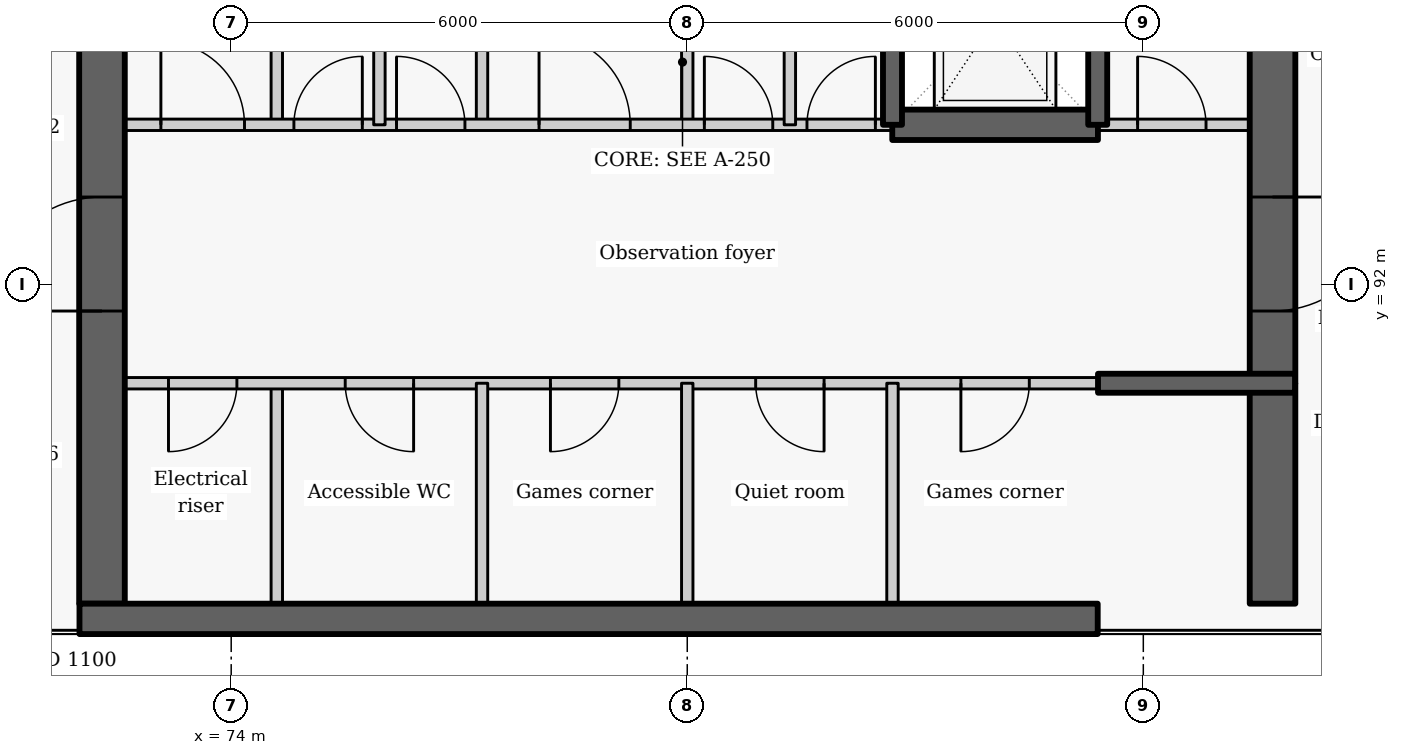
"""IFC4 building model, lengths in metres.
Left out: names, types, materials, properties, quantities, classifications, styles, units other than length and angle.
Written with IfcOpenShell. Run it as: python <this file> out.ifc"""

import sys

from ifc_helpers import new_model, si_unit, direction, frame, frame_2d, origin, place, context, subcontext, project, spatial, rectangle, extrude, element, fill, save


model = new_model("IFC4")
c1 = context("Model", 3, precision=1e-05, world=origin(), true_north=direction((0.0, 1.0)))
c2 = subcontext(c1, "Body", "Model", "MODEL_VIEW")
j1 = project(units=[si_unit("LENGTHUNIT", "METRE"), si_unit("PLANEANGLEUNIT", "RADIAN")], contexts=[c1])
p1 = place(None, origin())
s1 = spatial("IfcSite", under=j1, at=p1, CompositionType="ELEMENT")
p2 = place(p1, origin())
s2 = spatial("IfcBuilding", under=s1, at=p2, CompositionType="ELEMENT")
p3 = place(p2, frame((0.0, 0.0, 290.4)))
s3 = spatial("IfcBuildingStorey", under=s2, at=p3, CompositionType="ELEMENT", Elevation=290.4)
p4 = place(p3, frame((74.6, 87.8, 0.0), z_axis=(0.0, 0.0, 1.0), x_axis=(0.0, 1.0, 0.0)))
e1 = element("IfcWall", 1, at=p4, inside=s3, PredefinedType="PARTITIONING", context=c2, shape_type="SweptSolid", body=[
    extrude(rectangle(XDim=2.9, YDim=0.15, at=frame_2d((1.45, 0.0))), origin(), (0.0, 0.0, 1.0), 3.325),
])
p5 = place(p3, frame((74.6, 94.1, 0.0), z_axis=(0.0, 0.0, 1.0), x_axis=(0.0, 1.0, 0.0)))
e2 = element("IfcWall", 2, at=p5, inside=s3, PredefinedType="PARTITIONING", context=c2, shape_type="SweptSolid", body=[
    extrude(rectangle(XDim=2.8, YDim=0.15, at=frame_2d((1.4, 0.0))), origin(), (0.0, 0.0, 1.0), 3.325),
])
p6 = place(p3, frame((85.4, 90.7, 0.0), z_axis=(0.0, 0.0, 1.0), x_axis=(-1.0, 0.0, 0.0)))
e3 = element("IfcWall", 3, at=p6, inside=s3, PredefinedType="PARTITIONING", context=c2, shape_type="SweptSolid", body=[
    extrude(rectangle(XDim=13.4, YDim=0.15, at=frame_2d((6.7, 0.0))), origin(), (0.0, 0.0, 1.0), 3.325),
])
p7 = place(p6, frame((11.325, 0.0, 0.0)))
e4 = element("IfcOpeningElement", 4, at=p7, cuts=e3, PredefinedType="OPENING", context=c2, shape_type="SweptSolid", body=[
    extrude(rectangle(XDim=0.9, YDim=2.1, at=frame_2d((0.45, 1.05))), frame((0.0, 0.085, 0.0), z_axis=(0.0, -1.0, 0.0), x_axis=(1.0, 0.0, 0.0)), (0.0, 0.0, 1.0), 0.17),
])
p8 = place(p6, frame((9.0, 0.0, 0.0)))
e5 = element("IfcOpeningElement", 5, at=p8, cuts=e3, PredefinedType="OPENING", context=c2, shape_type="SweptSolid", body=[
    extrude(rectangle(XDim=0.9, YDim=2.1, at=frame_2d((0.45, 1.05))), frame((0.0, 0.085, 0.0), z_axis=(0.0, -1.0, 0.0), x_axis=(1.0, 0.0, 0.0)), (0.0, 0.0, 1.0), 0.17),
])
p9 = place(p6, frame((6.3, 0.0, 0.0)))
e6 = element("IfcOpeningElement", 6, at=p9, cuts=e3, PredefinedType="OPENING", context=c2, shape_type="SweptSolid", body=[
    extrude(rectangle(XDim=0.9, YDim=2.1, at=frame_2d((0.45, 1.05))), frame((0.0, 0.085, 0.0), z_axis=(0.0, -1.0, 0.0), x_axis=(1.0, 0.0, 0.0)), (0.0, 0.0, 1.0), 0.17),
])
p10 = place(p6, frame((3.6, 0.0, 0.0)))
e7 = element("IfcOpeningElement", 7, at=p10, cuts=e3, PredefinedType="OPENING", context=c2, shape_type="SweptSolid", body=[
    extrude(rectangle(XDim=0.9, YDim=2.1, at=frame_2d((0.45, 1.05))), frame((0.0, 0.085, 0.0), z_axis=(0.0, -1.0, 0.0), x_axis=(1.0, 0.0, 0.0)), (0.0, 0.0, 1.0), 0.17),
])
p11 = place(p6, frame((0.9, 0.0, 0.0)))
e8 = element("IfcOpeningElement", 8, at=p11, cuts=e3, PredefinedType="OPENING", context=c2, shape_type="SweptSolid", body=[
    extrude(rectangle(XDim=0.9, YDim=2.1, at=frame_2d((0.45, 1.05))), frame((0.0, 0.085, 0.0), z_axis=(0.0, -1.0, 0.0), x_axis=(1.0, 0.0, 0.0)), (0.0, 0.0, 1.0), 0.17),
])
p12 = place(p3, frame((72.3, 87.8, -0.275), z_axis=(0.0, 0.0, 1.0), x_axis=(0.0, 1.0, 0.0)))
e9 = element("IfcWall", 9, at=p12, inside=s3, PredefinedType="SHEAR", context=c2, shape_type="SweptSolid", body=[
    extrude(rectangle(XDim=9.1, YDim=0.6, at=frame_2d((4.55, 0.0))), origin(), (0.0, 0.0, 1.0), 3.6),
])
p13 = place(p12, frame((3.85, 0.0, 0.275)))
e10 = element("IfcOpeningElement", 10, at=p13, cuts=e9, PredefinedType="OPENING", context=c2, shape_type="SweptSolid", body=[
    extrude(rectangle(XDim=1.5, YDim=2.1, at=frame_2d((0.75, 1.05))), frame((0.0, 0.31, 0.0), z_axis=(0.0, -1.0, 0.0), x_axis=(1.0, 0.0, 0.0)), (0.0, 0.0, 1.0), 0.62),
])
p14 = place(p3, frame((77.3, 87.8, 0.0), z_axis=(0.0, 0.0, 1.0), x_axis=(0.0, 1.0, 0.0)))
e11 = element("IfcWall", 11, at=p14, inside=s3, PredefinedType="PARTITIONING", context=c2, shape_type="SweptSolid", body=[
    extrude(rectangle(XDim=2.9, YDim=0.15, at=frame_2d((1.45, 0.0))), origin(), (0.0, 0.0, 1.0), 3.325),
])
p15 = place(p3, frame((77.3, 94.1, 0.0), z_axis=(0.0, 0.0, 1.0), x_axis=(0.0, 1.0, 0.0)))
e12 = element("IfcWall", 12, at=p15, inside=s3, PredefinedType="PARTITIONING", context=c2, shape_type="SweptSolid", body=[
    extrude(rectangle(XDim=2.8, YDim=0.15, at=frame_2d((1.4, 0.0))), origin(), (0.0, 0.0, 1.0), 3.325),
])
p16 = place(p3, frame((80.0, 87.8, 0.0), z_axis=(0.0, 0.0, 1.0), x_axis=(0.0, 1.0, 0.0)))
e13 = element("IfcWall", 13, at=p16, inside=s3, PredefinedType="PARTITIONING", context=c2, shape_type="SweptSolid", body=[
    extrude(rectangle(XDim=2.9, YDim=0.15, at=frame_2d((1.45, 0.0))), origin(), (0.0, 0.0, 1.0), 3.325),
])
p17 = place(p3, frame((80.0, 94.1, 0.0), z_axis=(0.0, 0.0, 1.0), x_axis=(0.0, 1.0, 0.0)))
e14 = element("IfcWall", 14, at=p17, inside=s3, PredefinedType="PARTITIONING", context=c2, shape_type="SweptSolid", body=[
    extrude(rectangle(XDim=2.8, YDim=0.15, at=frame_2d((1.4, 0.0))), origin(), (0.0, 0.0, 1.0), 3.325),
])
p18 = place(p3, frame((82.7, 87.8, 0.0), z_axis=(0.0, 0.0, 1.0), x_axis=(0.0, 1.0, 0.0)))
e15 = element("IfcWall", 15, at=p18, inside=s3, PredefinedType="PARTITIONING", context=c2, shape_type="SweptSolid", body=[
    extrude(rectangle(XDim=2.9, YDim=0.15, at=frame_2d((1.45, 0.0))), origin(), (0.0, 0.0, 1.0), 3.325),
])
p19 = place(p3, frame((72.0, 94.1, 0.0), z_axis=(0.0, 0.0, 1.0), x_axis=(1.0, 0.0, 0.0)))
e16 = element("IfcWall", 16, at=p19, inside=s3, PredefinedType="PARTITIONING", context=c2, shape_type="SweptSolid", body=[
    extrude(rectangle(XDim=10.703, YDim=0.15, at=frame_2d((5.352, 0.0))), origin(), (0.0, 0.0, 1.0), 3.325),
])
p20 = place(p19, frame((1.075, 0.0, 0.0)))
e17 = element("IfcOpeningElement", 17, at=p20, cuts=e16, PredefinedType="OPENING", context=c2, shape_type="SweptSolid", body=[
    extrude(rectangle(XDim=1.1, YDim=2.1, at=frame_2d((0.55, 1.05))), frame((0.0, 0.085, 0.0), z_axis=(0.0, -1.0, 0.0), x_axis=(1.0, 0.0, 0.0)), (0.0, 0.0, 1.0), 0.17),
])
p21 = place(p19, frame((2.825, 0.0, 0.0)))
e18 = element("IfcOpeningElement", 18, at=p21, cuts=e16, PredefinedType="OPENING", context=c2, shape_type="SweptSolid", body=[
    extrude(rectangle(XDim=0.9, YDim=2.1, at=frame_2d((0.45, 1.05))), frame((0.0, 0.085, 0.0), z_axis=(0.0, -1.0, 0.0), x_axis=(1.0, 0.0, 0.0)), (0.0, 0.0, 1.0), 0.17),
])
p22 = place(p19, frame((4.175, 0.0, 0.0)))
e19 = element("IfcOpeningElement", 19, at=p22, cuts=e16, PredefinedType="OPENING", context=c2, shape_type="SweptSolid", body=[
    extrude(rectangle(XDim=0.9, YDim=2.1, at=frame_2d((0.45, 1.05))), frame((0.0, 0.085, 0.0), z_axis=(0.0, -1.0, 0.0), x_axis=(1.0, 0.0, 0.0)), (0.0, 0.0, 1.0), 0.17),
])
p23 = place(p19, frame((6.05, 0.0, 0.0)))
e20 = element("IfcOpeningElement", 20, at=p23, cuts=e16, PredefinedType="OPENING", context=c2, shape_type="SweptSolid", body=[
    extrude(rectangle(XDim=1.2, YDim=2.1, at=frame_2d((0.6, 1.05))), frame((0.0, 0.085, 0.0), z_axis=(0.0, -1.0, 0.0), x_axis=(1.0, 0.0, 0.0)), (0.0, 0.0, 1.0), 0.17),
])
p24 = place(p19, frame((8.225, 0.0, 0.0)))
e21 = element("IfcOpeningElement", 21, at=p24, cuts=e16, PredefinedType="OPENING", context=c2, shape_type="SweptSolid", body=[
    extrude(rectangle(XDim=0.9, YDim=2.1, at=frame_2d((0.45, 1.05))), frame((0.0, 0.085, 0.0), z_axis=(0.0, -1.0, 0.0), x_axis=(1.0, 0.0, 0.0)), (0.0, 0.0, 1.0), 0.17),
])
p25 = place(p19, frame((9.575, 0.0, 0.0)))
e22 = element("IfcOpeningElement", 22, at=p25, cuts=e16, PredefinedType="OPENING", context=c2, shape_type="SweptSolid", body=[
    extrude(rectangle(XDim=0.9, YDim=2.1, at=frame_2d((0.45, 1.05))), frame((0.0, 0.085, 0.0), z_axis=(0.0, -1.0, 0.0), x_axis=(1.0, 0.0, 0.0)), (0.0, 0.0, 1.0), 0.17),
])
p26 = place(p3, frame((85.397, 94.1, 0.0), z_axis=(0.0, 0.0, 1.0), x_axis=(1.0, 0.0, 0.0)))
e23 = element("IfcWall", 23, at=p26, inside=s3, PredefinedType="PARTITIONING", context=c2, shape_type="SweptSolid", body=[
    extrude(rectangle(XDim=2.603, YDim=0.15, at=frame_2d((1.302, 0.0))), origin(), (0.0, 0.0, 1.0), 3.325),
])
p27 = place(p26, frame((0.528, 0.0, 0.0)))
e24 = element("IfcOpeningElement", 24, at=p27, cuts=e23, PredefinedType="OPENING", context=c2, shape_type="SweptSolid", body=[
    extrude(rectangle(XDim=0.9, YDim=2.1, at=frame_2d((0.45, 1.05))), frame((0.0, 0.085, 0.0), z_axis=(0.0, -1.0, 0.0), x_axis=(1.0, 0.0, 0.0)), (0.0, 0.0, 1.0), 0.17),
])
p28 = place(p3, frame((82.697, 94.1, -0.275), z_axis=(0.0, 0.0, 1.0), x_axis=(1.0, 0.0, 0.0)))
e25 = element("IfcWall", 25, at=p28, inside=s3, PredefinedType="SHEAR", context=c2, shape_type="SweptSolid", body=[
    extrude(rectangle(XDim=2.706, YDim=0.4, at=frame_2d((1.353, 0.0))), origin(), (0.0, 0.0, 1.0), 3.6),
])
p29 = place(p3, frame((87.7, 102.05, -0.275), z_axis=(0.0, 0.0, 1.0), x_axis=(0.0, -1.0, 0.0)))
e26 = element("IfcWall", 26, at=p29, inside=s3, PredefinedType="SHEAR", context=c2, shape_type="SweptSolid", body=[
    extrude(rectangle(XDim=11.35, YDim=0.6, at=frame_2d((5.675, 0.0))), origin(), (0.0, 0.0, 1.0), 3.6),
])
p30 = place(p29, frame((8.9, 0.0, 0.275)))
e27 = element("IfcOpeningElement", 27, at=p30, cuts=e26, PredefinedType="OPENING", context=c2, shape_type="SweptSolid", body=[
    extrude(rectangle(XDim=1.5, YDim=2.1, at=frame_2d((0.75, 1.05))), frame((0.0, 0.31, 0.0), z_axis=(0.0, -1.0, 0.0), x_axis=(1.0, 0.0, 0.0)), (0.0, 0.0, 1.0), 0.62),
])
p31 = place(p29, frame((2.025, 0.0, 0.275)))
e28 = element("IfcOpeningElement", 28, at=p31, cuts=e26, PredefinedType="OPENING", context=c2, shape_type="SweptSolid", body=[
    extrude(rectangle(XDim=1.1, YDim=2.1, at=frame_2d((0.55, 1.05))), frame((0.0, 0.31, 0.0), z_axis=(0.0, -1.0, 0.0), x_axis=(1.0, 0.0, 0.0)), (0.0, 0.0, 1.0), 0.62),
])
for number, where, z_axis, x_axis in (
    (29, (75.95, 94.1, 0.0), (0.0, 0.0, 1.0), (0.0, 1.0, 0.0)),
    (30, (81.35, 94.1, 0.0), (0.0, 0.0, 1.0), (0.0, 1.0, 0.0)),
):
    element("IfcWall", number, at=place(p3, frame(where, z_axis=z_axis, x_axis=x_axis)), inside=s3, PredefinedType="PARTITIONING", context=c2, shape_type="SweptSolid", body=[
        extrude(rectangle(XDim=2.8, YDim=0.15, at=frame_2d((1.4, 0.0))), origin(), (0.0, 0.0, 1.0), 3.325),
    ])
for number, where, z_axis, x_axis in (
    (31, (82.7, 94.1, -0.275), (0.0, 0.0, 1.0), (0.0, 1.0, 0.0)),
    (32, (85.4, 94.1, -0.275), (0.0, 0.0, 1.0), (0.0, 1.0, 0.0)),
):
    element("IfcWall", number, at=place(p3, frame(where, z_axis=z_axis, x_axis=x_axis)), inside=s3, PredefinedType="SHEAR", context=c2, shape_type="SweptSolid", body=[
        extrude(rectangle(XDim=2.8, YDim=0.25, at=frame_2d((1.4, 0.0))), origin(), (0.0, 0.0, 1.0), 3.6),
    ])
p32 = place(p3, frame((72.004, 87.6, -0.275), z_axis=(0.0, 0.0, 1.0), x_axis=(1.0, 0.0, 0.0)))
e33 = element("IfcWall", 33, at=p32, inside=s3, PredefinedType="SHEAR", context=c2, shape_type="SweptSolid", body=[
    extrude(rectangle(XDim=13.396, YDim=0.4, at=frame_2d((6.698, 0.0))), origin(), (0.0, 0.0, 1.0), 3.6),
])
p33 = place(p3, frame((87.7, 87.8, -0.275), z_axis=(0.0, 0.0, 1.0), x_axis=(0.0, 1.0, 0.0)))
e34 = element("IfcWall", 34, at=p33, inside=s3, PredefinedType="SHEAR", context=c2, shape_type="SweptSolid", body=[
    extrude(rectangle(XDim=2.896, YDim=0.6, at=frame_2d((1.448, 0.0))), origin(), (0.0, 0.0, 1.0), 3.6),
])
p34 = place(p3, frame((85.404, 90.7, -0.275), z_axis=(0.0, 0.0, 1.0), x_axis=(1.0, 0.0, 0.0)))
e35 = element("IfcWall", 35, at=p34, inside=s3, PredefinedType="SHEAR", context=c2, shape_type="SweptSolid", body=[
    extrude(rectangle(XDim=2.592, YDim=0.25, at=frame_2d((1.296, 0.0))), origin(), (0.0, 0.0, 1.0), 3.6),
])
p35 = place(p7, origin())
e36 = element("IfcDoor", 36, at=p35, inside=s3, OperationType="SINGLE_SWING_RIGHT", PredefinedType="DOOR", context=c2, shape_type="SweptSolid", body=[
    extrude(rectangle(XDim=0.9, YDim=2.1, at=frame_2d((0.45, 1.05))), frame((0.0, 0.025, 0.0), z_axis=(0.0, -1.0, 0.0), x_axis=(1.0, 0.0, 0.0)), (0.0, 0.0, 1.0), 0.05),
])
fill(e4, e36)
p36 = place(p8, origin())
e37 = element("IfcDoor", 37, at=p36, inside=s3, OperationType="SINGLE_SWING_LEFT", PredefinedType="DOOR", context=c2, shape_type="SweptSolid", body=[
    extrude(rectangle(XDim=0.9, YDim=2.1, at=frame_2d((0.45, 1.05))), frame((0.0, 0.025, 0.0), z_axis=(0.0, -1.0, 0.0), x_axis=(1.0, 0.0, 0.0)), (0.0, 0.0, 1.0), 0.05),
])
fill(e5, e37)
p37 = place(p9, origin())
e38 = element("IfcDoor", 38, at=p37, inside=s3, OperationType="SINGLE_SWING_RIGHT", PredefinedType="DOOR", context=c2, shape_type="SweptSolid", body=[
    extrude(rectangle(XDim=0.9, YDim=2.1, at=frame_2d((0.45, 1.05))), frame((0.0, 0.025, 0.0), z_axis=(0.0, -1.0, 0.0), x_axis=(1.0, 0.0, 0.0)), (0.0, 0.0, 1.0), 0.05),
])
fill(e6, e38)
p38 = place(p10, origin())
e39 = element("IfcDoor", 39, at=p38, inside=s3, OperationType="SINGLE_SWING_LEFT", PredefinedType="DOOR", context=c2, shape_type="SweptSolid", body=[
    extrude(rectangle(XDim=0.9, YDim=2.1, at=frame_2d((0.45, 1.05))), frame((0.0, 0.025, 0.0), z_axis=(0.0, -1.0, 0.0), x_axis=(1.0, 0.0, 0.0)), (0.0, 0.0, 1.0), 0.05),
])
fill(e7, e39)
p39 = place(p11, origin())
e40 = element("IfcDoor", 40, at=p39, inside=s3, OperationType="SINGLE_SWING_RIGHT", PredefinedType="DOOR", context=c2, shape_type="SweptSolid", body=[
    extrude(rectangle(XDim=0.9, YDim=2.1, at=frame_2d((0.45, 1.05))), frame((0.0, 0.025, 0.0), z_axis=(0.0, -1.0, 0.0), x_axis=(1.0, 0.0, 0.0)), (0.0, 0.0, 1.0), 0.05),
])
fill(e8, e40)
p40 = place(p20, origin())
e41 = element("IfcDoor", 41, at=p40, inside=s3, OperationType="SINGLE_SWING_LEFT", PredefinedType="DOOR", context=c2, shape_type="SweptSolid", body=[
    extrude(rectangle(XDim=1.1, YDim=2.1, at=frame_2d((0.55, 1.05))), frame((0.0, 0.025, 0.0), z_axis=(0.0, -1.0, 0.0), x_axis=(1.0, 0.0, 0.0)), (0.0, 0.0, 1.0), 0.05),
])
fill(e17, e41)
p41 = place(p21, origin())
e42 = element("IfcDoor", 42, at=p41, inside=s3, OperationType="SINGLE_SWING_RIGHT", PredefinedType="DOOR", context=c2, shape_type="SweptSolid", body=[
    extrude(rectangle(XDim=0.9, YDim=2.1, at=frame_2d((0.45, 1.05))), frame((0.0, 0.025, 0.0), z_axis=(0.0, -1.0, 0.0), x_axis=(1.0, 0.0, 0.0)), (0.0, 0.0, 1.0), 0.05),
])
fill(e18, e42)
p42 = place(p22, origin())
e43 = element("IfcDoor", 43, at=p42, inside=s3, OperationType="SINGLE_SWING_LEFT", PredefinedType="DOOR", context=c2, shape_type="SweptSolid", body=[
    extrude(rectangle(XDim=0.9, YDim=2.1, at=frame_2d((0.45, 1.05))), frame((0.0, 0.025, 0.0), z_axis=(0.0, -1.0, 0.0), x_axis=(1.0, 0.0, 0.0)), (0.0, 0.0, 1.0), 0.05),
])
fill(e19, e43)
p43 = place(p23, origin())
e44 = element("IfcDoor", 44, at=p43, inside=s3, OperationType="DOUBLE_DOOR_SINGLE_SWING", PredefinedType="DOOR", context=c2, shape_type="SweptSolid", body=[
    extrude(rectangle(XDim=1.2, YDim=2.1, at=frame_2d((0.6, 1.05))), frame((0.0, 0.025, 0.0), z_axis=(0.0, -1.0, 0.0), x_axis=(1.0, 0.0, 0.0)), (0.0, 0.0, 1.0), 0.05),
])
fill(e20, e44)
p44 = place(p24, origin())
e45 = element("IfcDoor", 45, at=p44, inside=s3, OperationType="SINGLE_SWING_LEFT", PredefinedType="DOOR", context=c2, shape_type="SweptSolid", body=[
    extrude(rectangle(XDim=0.9, YDim=2.1, at=frame_2d((0.45, 1.05))), frame((0.0, 0.025, 0.0), z_axis=(0.0, -1.0, 0.0), x_axis=(1.0, 0.0, 0.0)), (0.0, 0.0, 1.0), 0.05),
])
fill(e21, e45)
p45 = place(p25, origin())
e46 = element("IfcDoor", 46, at=p45, inside=s3, OperationType="SINGLE_SWING_RIGHT", PredefinedType="DOOR", context=c2, shape_type="SweptSolid", body=[
    extrude(rectangle(XDim=0.9, YDim=2.1, at=frame_2d((0.45, 1.05))), frame((0.0, 0.025, 0.0), z_axis=(0.0, -1.0, 0.0), x_axis=(1.0, 0.0, 0.0)), (0.0, 0.0, 1.0), 0.05),
])
fill(e22, e46)
p46 = place(p27, origin())
e47 = element("IfcDoor", 47, at=p46, inside=s3, OperationType="SINGLE_SWING_LEFT", PredefinedType="DOOR", context=c2, shape_type="SweptSolid", body=[
    extrude(rectangle(XDim=0.9, YDim=2.1, at=frame_2d((0.45, 1.05))), frame((0.0, 0.025, 0.0), z_axis=(0.0, -1.0, 0.0), x_axis=(1.0, 0.0, 0.0)), (0.0, 0.0, 1.0), 0.05),
])
fill(e24, e47)
p47 = place(p30, origin())
e48 = element("IfcDoor", 48, at=p47, inside=s3, OperationType="DOUBLE_DOOR_SINGLE_SWING", PredefinedType="DOOR", context=c2, shape_type="SweptSolid", body=[
    extrude(rectangle(XDim=1.5, YDim=2.1, at=frame_2d((0.75, 1.05))), frame((0.0, 0.025, 0.0), z_axis=(0.0, -1.0, 0.0), x_axis=(1.0, 0.0, 0.0)), (0.0, 0.0, 1.0), 0.05),
])
fill(e27, e48)
p48 = place(p13, origin())
e49 = element("IfcDoor", 49, at=p48, inside=s3, OperationType="DOUBLE_DOOR_SINGLE_SWING", PredefinedType="DOOR", context=c2, shape_type="SweptSolid", body=[
    extrude(rectangle(XDim=1.5, YDim=2.1, at=frame_2d((0.75, 1.05))), frame((0.0, 0.025, 0.0), z_axis=(0.0, -1.0, 0.0), x_axis=(1.0, 0.0, 0.0)), (0.0, 0.0, 1.0), 0.05),
])
fill(e10, e49)
save(model, sys.argv[1])
